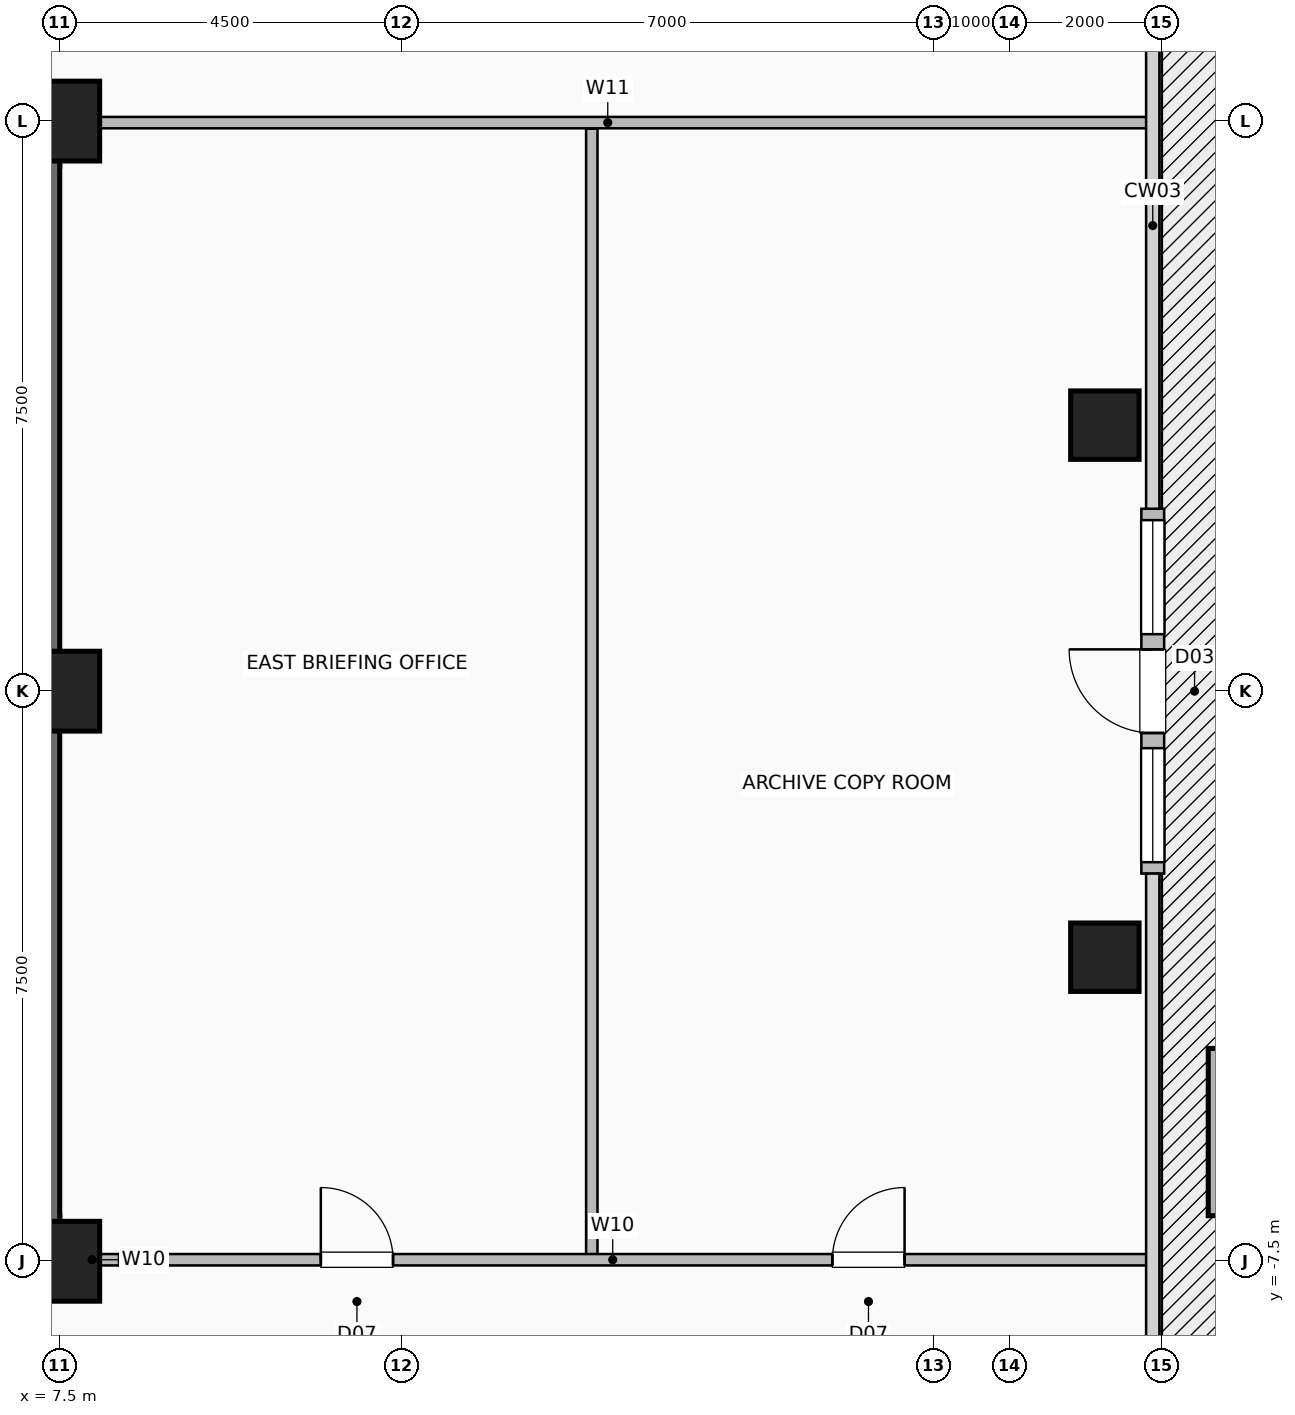
"""IFC4 building model, lengths in metres.
Left out: names, types, materials, properties, quantities, classifications, styles, units other than length and angle.
Written with IfcOpenShell. Run it as: python <this file> out.ifc"""

import sys

from ifc_helpers import new_model, si_unit, direction, frame, frame_2d, origin, origin_2d, place, context, subcontext, project, spatial, rectangle, hollow_rectangle, extrude, element, fill, save


model = new_model("IFC4")
c1 = context("Model", 3, precision=1e-05, world=origin(), true_north=direction((0.0, 1.0)))
c2 = subcontext(c1, "Body", "Model", "MODEL_VIEW")
j1 = project(units=[si_unit("LENGTHUNIT", "METRE"), si_unit("PLANEANGLEUNIT", "RADIAN")], contexts=[c1])
p1 = place(None, origin())
s1 = spatial("IfcSite", under=j1, at=p1, CompositionType="ELEMENT")
p2 = place(p1, origin())
s2 = spatial("IfcBuilding", under=s1, at=p2, CompositionType="ELEMENT")
p3 = place(p2, frame((0.0, 0.0, 122.8)))
s3 = spatial("IfcBuildingStorey", under=s2, at=p3, CompositionType="ELEMENT", Elevation=122.8)
for number, where, z_axis, x_axis in (
    (1, (7.5, -7.5, 0.0), (0.0, 0.0, 1.0), (1.0, 0.0, 0.0)),
    (2, (7.5, 0.0, 0.0), (0.0, 0.0, 1.0), (1.0, 0.0, 0.0)),
    (3, (7.5, 7.5, 0.0), (0.0, 0.0, 1.0), (1.0, 0.0, 0.0)),
):
    element("IfcColumn", number, at=place(p3, frame(where, z_axis=z_axis, x_axis=x_axis)), inside=s3, PredefinedType="COLUMN", context=c2, shape_type="SweptSolid", body=[
        extrude(hollow_rectangle(XDim=1.05, YDim=1.05, WallThickness=0.05, at=origin_2d()), origin(), (0.0, 0.0, 1.0), 3.6),
    ])
for number, where, z_axis, x_axis in (
    (4, (21.25, -3.5, 0.0), (0.0, 0.0, 1.0), (1.0, 0.0, 0.0)),
    (5, (21.25, 3.5, 0.0), (0.0, 0.0, 1.0), (1.0, 0.0, 0.0)),
):
    element("IfcColumn", number, at=place(p3, frame(where, z_axis=z_axis, x_axis=x_axis)), inside=s3, PredefinedType="COLUMN", context=c2, shape_type="SweptSolid", body=[
        extrude(hollow_rectangle(XDim=0.9, YDim=0.9, WallThickness=0.045, at=origin_2d()), origin(), (0.0, 0.0, 1.0), 3.6),
    ])
p4 = place(p3, frame((21.88, -2.4, 0.0), z_axis=(0.0, 0.0, 1.0), x_axis=(0.0, 1.0, 0.0)))
e6 = element("IfcWall", 6, at=p4, inside=s3, PredefinedType="SOLIDWALL", context=c2, shape_type="SweptSolid", body=[
    extrude(rectangle(XDim=4.8, YDim=0.3, at=frame_2d((2.4, 0.0))), origin(), (0.0, 0.0, 1.0), 3.36),
])
p5 = place(p4, frame((1.85, 0.0, 0.0)))
e7 = element("IfcOpeningElement", 7, at=p5, cuts=e6, PredefinedType="OPENING", context=c2, shape_type="SweptSolid", body=[
    extrude(rectangle(XDim=1.1, YDim=2.2, at=frame_2d((0.55, 1.1))), frame((0.0, 0.16, 0.0), z_axis=(0.0, -1.0, 0.0), x_axis=(1.0, 0.0, 0.0)), (0.0, 0.0, 1.0), 0.32),
])
p6 = place(p4, frame((0.15, 0.0, 0.85)))
e8 = element("IfcOpeningElement", 8, at=p6, cuts=e6, PredefinedType="OPENING", context=c2, shape_type="SweptSolid", body=[
    extrude(rectangle(XDim=1.5, YDim=1.8, at=frame_2d((0.75, 0.9))), frame((0.0, 0.16, 0.0), z_axis=(0.0, -1.0, 0.0), x_axis=(1.0, 0.0, 0.0)), (0.0, 0.0, 1.0), 0.32),
])
p7 = place(p4, frame((3.15, 0.0, 0.85)))
e9 = element("IfcOpeningElement", 9, at=p7, cuts=e6, PredefinedType="OPENING", context=c2, shape_type="SweptSolid", body=[
    extrude(rectangle(XDim=1.5, YDim=1.8, at=frame_2d((0.75, 0.9))), frame((0.0, 0.16, 0.0), z_axis=(0.0, -1.0, 0.0), x_axis=(1.0, 0.0, 0.0)), (0.0, 0.0, 1.0), 0.32),
])
p8 = place(p3, frame((-7.5, -7.2, 0.0), z_axis=(0.0, 0.0, 1.0), x_axis=(1.0, 0.0, 0.0)))
e10 = element("IfcWall", 10, at=p8, inside=s3, PredefinedType="SHEAR", context=c2, shape_type="SweptSolid", body=[
    extrude(rectangle(XDim=15.0, YDim=0.6, at=frame_2d((7.5, 0.0))), origin(), (0.0, 0.0, 1.0), 3.36),
])
p9 = place(p8, frame((1.55, 0.0, 0.0)))
e11 = element("IfcOpeningElement", 11, at=p9, cuts=e10, PredefinedType="OPENING", context=c2, shape_type="SweptSolid", body=[
    extrude(rectangle(XDim=1.05, YDim=2.08, at=frame_2d((0.525, 1.04))), frame((0.0, 0.31, 0.0), z_axis=(0.0, -1.0, 0.0), x_axis=(1.0, 0.0, 0.0)), (0.0, 0.0, 1.0), 0.62),
])
p10 = place(p8, frame((12.4, 0.0, 0.0)))
e12 = element("IfcOpeningElement", 12, at=p10, cuts=e10, PredefinedType="OPENING", context=c2, shape_type="SweptSolid", body=[
    extrude(rectangle(XDim=1.05, YDim=2.08, at=frame_2d((0.525, 1.04))), frame((0.0, 0.31, 0.0), z_axis=(0.0, -1.0, 0.0), x_axis=(1.0, 0.0, 0.0)), (0.0, 0.0, 1.0), 0.62),
])
p11 = place(p8, frame((5.2, 0.0, 0.0)))
e13 = element("IfcOpeningElement", 13, at=p11, cuts=e10, PredefinedType="OPENING", context=c2, shape_type="SweptSolid", body=[
    extrude(rectangle(XDim=1.0, YDim=2.08, at=frame_2d((0.5, 1.04))), frame((0.0, 0.31, 0.0), z_axis=(0.0, -1.0, 0.0), x_axis=(1.0, 0.0, 0.0)), (0.0, 0.0, 1.0), 0.62),
])
p12 = place(p8, frame((8.65, 0.0, 0.0)))
e14 = element("IfcOpeningElement", 14, at=p12, cuts=e10, PredefinedType="OPENING", context=c2, shape_type="SweptSolid", body=[
    extrude(rectangle(XDim=1.0, YDim=2.08, at=frame_2d((0.5, 1.04))), frame((0.0, 0.31, 0.0), z_axis=(0.0, -1.0, 0.0), x_axis=(1.0, 0.0, 0.0)), (0.0, 0.0, 1.0), 0.62),
])
for number, where, z_axis, x_axis in (
    (15, (-7.5, 7.2, 0.0), (0.0, 0.0, 1.0), (1.0, 0.0, 0.0)),
    (16, (7.2, -7.5, 0.0), (0.0, 0.0, 1.0), (0.0, 1.0, 0.0)),
):
    element("IfcWall", number, at=place(p3, frame(where, z_axis=z_axis, x_axis=x_axis)), inside=s3, PredefinedType="SHEAR", context=c2, shape_type="SweptSolid", body=[
        extrude(rectangle(XDim=15.0, YDim=0.6, at=frame_2d((7.5, 0.0))), origin(), (0.0, 0.0, 1.0), 3.36),
    ])
p13 = place(p3, frame((7.45, -7.48, 0.0), z_axis=(0.0, 0.0, 1.0), x_axis=(1.0, 0.0, 0.0)))
e17 = element("IfcWall", 17, at=p13, inside=s3, PredefinedType="PARTITIONING", context=c2, shape_type="SweptSolid", body=[
    extrude(rectangle(XDim=0.95, YDim=0.15, at=frame_2d((0.475, 0.0))), origin(), (0.0, 0.0, 1.0), 3.36),
])
p14 = place(p3, frame((14.5, -7.48, 0.0), z_axis=(0.0, 0.0, 1.0), x_axis=(0.0, 1.0, 0.0)))
e18 = element("IfcWall", 18, at=p14, inside=s3, PredefinedType="PARTITIONING", context=c2, shape_type="SweptSolid", body=[
    extrude(rectangle(XDim=14.88, YDim=0.15, at=frame_2d((7.44, 0.0))), origin(), (0.0, 0.0, 1.0), 3.36),
])
p15 = place(p3, frame((8.28, -7.48, 0.0), z_axis=(0.0, 0.0, 1.0), x_axis=(1.0, 0.0, 0.0)))
e19 = element("IfcWall", 19, at=p15, inside=s3, PredefinedType="PARTITIONING", context=c2, shape_type="SweptSolid", body=[
    extrude(rectangle(XDim=13.54, YDim=0.15, at=frame_2d((6.77, 0.0))), origin(), (0.0, 0.0, 1.0), 3.36),
])
p16 = place(p15, frame((2.655, 0.0, 0.0)))
e20 = element("IfcOpeningElement", 20, at=p16, cuts=e19, PredefinedType="OPENING", context=c2, shape_type="SweptSolid", body=[
    extrude(rectangle(XDim=0.95, YDim=2.06, at=frame_2d((0.475, 1.03))), frame((0.0, 0.085, 0.0), z_axis=(0.0, -1.0, 0.0), x_axis=(1.0, 0.0, 0.0)), (0.0, 0.0, 1.0), 0.17),
])
p17 = place(p15, frame((9.385, 0.0, 0.0)))
e21 = element("IfcOpeningElement", 21, at=p17, cuts=e19, PredefinedType="OPENING", context=c2, shape_type="SweptSolid", body=[
    extrude(rectangle(XDim=0.95, YDim=2.06, at=frame_2d((0.475, 1.03))), frame((0.0, 0.085, 0.0), z_axis=(0.0, -1.0, 0.0), x_axis=(1.0, 0.0, 0.0)), (0.0, 0.0, 1.0), 0.17),
])
p18 = place(p3, frame((7.6, 7.48, 0.0), z_axis=(0.0, 0.0, 1.0), x_axis=(1.0, 0.0, 0.0)))
e22 = element("IfcWall", 22, at=p18, inside=s3, PredefinedType="PARTITIONING", context=c2, shape_type="SweptSolid", body=[
    extrude(rectangle(XDim=14.22, YDim=0.15, at=frame_2d((7.11, 0.0))), origin(), (0.0, 0.0, 1.0), 3.36),
])
p19 = place(p5, origin())
e23 = element("IfcDoor", 23, at=p19, inside=s3, OperationType="SINGLE_SWING_RIGHT", PredefinedType="DOOR", context=c2, shape_type="SweptSolid", body=[
    extrude(rectangle(XDim=1.1, YDim=2.2, at=frame_2d((0.55, 1.1))), frame((0.0, 0.025, 0.0), z_axis=(0.0, -1.0, 0.0), x_axis=(1.0, 0.0, 0.0)), (0.0, 0.0, 1.0), 0.05),
])
fill(e7, e23)
p20 = place(p6, origin())
e24 = element("IfcWindow", 24, at=p20, inside=s3, PartitioningType="SINGLE_PANEL", PredefinedType="WINDOW", context=c2, shape_type="SweptSolid", body=[
    extrude(rectangle(XDim=1.5, YDim=1.8, at=frame_2d((0.75, 0.9))), frame((0.0, 0.03, 0.0), z_axis=(0.0, -1.0, 0.0), x_axis=(1.0, 0.0, 0.0)), (0.0, 0.0, 1.0), 0.06),
])
fill(e8, e24)
p21 = place(p7, origin())
e25 = element("IfcWindow", 25, at=p21, inside=s3, PartitioningType="SINGLE_PANEL", PredefinedType="WINDOW", context=c2, shape_type="SweptSolid", body=[
    extrude(rectangle(XDim=1.5, YDim=1.8, at=frame_2d((0.75, 0.9))), frame((0.0, 0.03, 0.0), z_axis=(0.0, -1.0, 0.0), x_axis=(1.0, 0.0, 0.0)), (0.0, 0.0, 1.0), 0.06),
])
fill(e9, e25)
p22 = place(p16, origin())
e26 = element("IfcDoor", 26, at=p22, inside=s3, OperationType="SINGLE_SWING_LEFT", PredefinedType="DOOR", context=c2, shape_type="SweptSolid", body=[
    extrude(rectangle(XDim=0.95, YDim=2.06, at=frame_2d((0.475, 1.03))), frame((0.0, 0.025, 0.0), z_axis=(0.0, -1.0, 0.0), x_axis=(1.0, 0.0, 0.0)), (0.0, 0.0, 1.0), 0.05),
])
fill(e20, e26)
p23 = place(p17, origin())
e27 = element("IfcDoor", 27, at=p23, inside=s3, OperationType="SINGLE_SWING_RIGHT", PredefinedType="DOOR", context=c2, shape_type="SweptSolid", body=[
    extrude(rectangle(XDim=0.95, YDim=2.06, at=frame_2d((0.475, 1.03))), frame((0.0, 0.025, 0.0), z_axis=(0.0, -1.0, 0.0), x_axis=(1.0, 0.0, 0.0)), (0.0, 0.0, 1.0), 0.05),
])
fill(e21, e27)
save(model, sys.argv[1])
